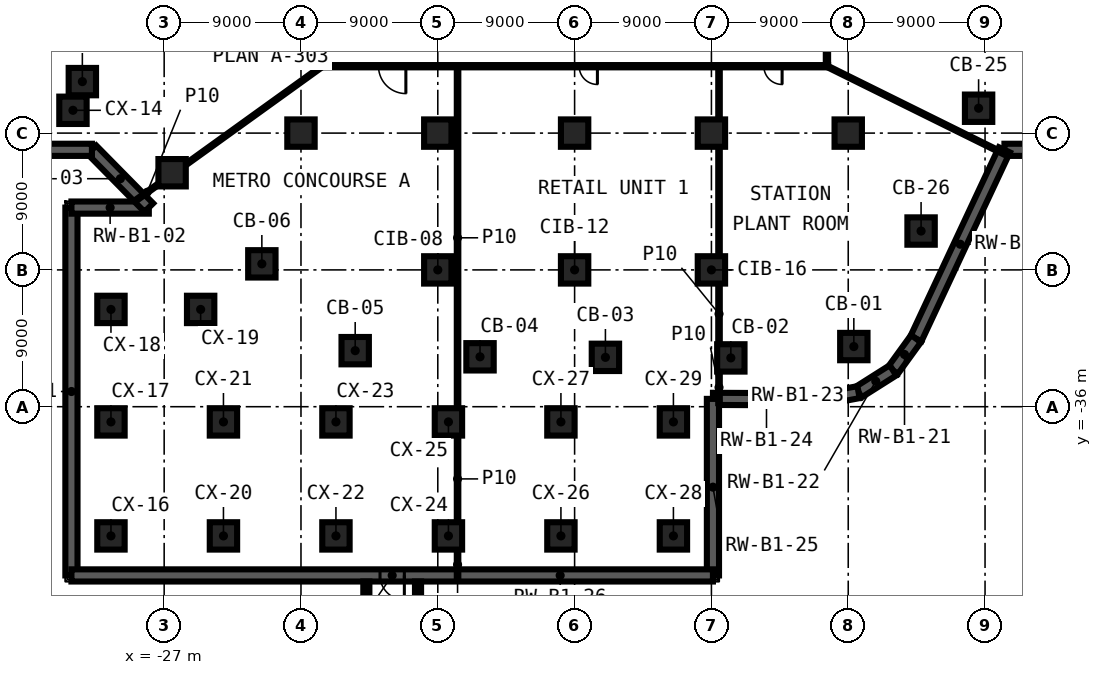
"""IFC4 building model, lengths in metres.
Left out: names, types, materials, properties, quantities, classifications, styles, units other than length and angle.
Written with IfcOpenShell. Run it as: python <this file> out.ifc"""

import sys

from ifc_helpers import new_model, si_unit, direction, frame, frame_2d, origin, origin_2d, place, context, subcontext, project, spatial, rectangle, extrude, element, fill, save


model = new_model("IFC4")
c1 = context("Model", 3, precision=1e-05, world=origin(), true_north=direction((0.0, 1.0)))
c2 = subcontext(c1, "Body", "Model", "MODEL_VIEW")
j1 = project(units=[si_unit("LENGTHUNIT", "METRE"), si_unit("PLANEANGLEUNIT", "RADIAN")], contexts=[c1])
p1 = place(None, origin())
s1 = spatial("IfcSite", under=j1, at=p1, CompositionType="ELEMENT")
p2 = place(p1, origin())
s2 = spatial("IfcBuilding", under=s1, at=p2, CompositionType="ELEMENT")
p3 = place(p2, frame((0.0, 0.0, -6.0)))
s3 = spatial("IfcBuildingStorey", under=s2, at=p3, CompositionType="ELEMENT", Elevation=-6.0)
for number, where, z_axis, x_axis in (
    (1, (18.368, -32.043, 0.0), (0.0, 0.0, 1.0), (1.0, 0.0, 0.0)),
    (2, (10.277, -32.79, 0.0), (0.0, 0.0, 1.0), (1.0, 0.0, 0.0)),
    (3, (2.027, -32.753, 0.0), (0.0, 0.0, 1.0), (1.0, 0.0, 0.0)),
    (4, (-6.222, -32.717, 0.0), (0.0, 0.0, 1.0), (1.0, 0.0, 0.0)),
    (5, (-14.434, -32.313, 0.0), (0.0, 0.0, 1.0), (1.0, 0.0, 0.0)),
    (6, (-20.574, -26.602, 0.0), (0.0, 0.0, 1.0), (1.0, 0.0, 0.0)),
    (7, (-26.478, -20.608, 0.0), (0.0, 0.0, 1.0), (1.0, 0.0, 0.0)),
    (8, (-32.382, -14.613, 0.0), (0.0, 0.0, 1.0), (1.0, 0.0, 0.0)),
    (9, (26.576, -16.364, 0.0), (0.0, 0.0, 1.0), (1.0, 0.0, 0.0)),
    (10, (22.792, -24.443, 0.0), (0.0, 0.0, 1.0), (1.0, 0.0, 0.0)),
    (11, (-18.0, -18.0, 0.0), (0.0, 0.0, 1.0), (1.0, 0.0, 0.0)),
    (12, (-9.0, -27.0, 0.0), (0.0, 0.0, 1.0), (1.0, 0.0, 0.0)),
    (13, (-9.0, -18.0, 0.0), (0.0, 0.0, 1.0), (1.0, 0.0, 0.0)),
    (14, (0.0, -27.0, 0.0), (0.0, 0.0, 1.0), (1.0, 0.0, 0.0)),
    (15, (0.0, -18.0, 0.0), (0.0, 0.0, 1.0), (1.0, 0.0, 0.0)),
    (16, (9.0, -27.0, 0.0), (0.0, 0.0, 1.0), (1.0, 0.0, 0.0)),
    (17, (9.0, -18.0, 0.0), (0.0, 0.0, 1.0), (1.0, 0.0, 0.0)),
    (18, (18.0, -18.0, 0.0), (0.0, 0.0, 1.0), (1.0, 0.0, 0.0)),
    (19, (-33.0, -16.5, 0.0), (0.0, 0.0, 1.0), (1.0, 0.0, 0.0)),
    (20, (-30.5, -44.5, 0.0), (0.0, 0.0, 1.0), (1.0, 0.0, 0.0)),
    (21, (-30.5, -37.0, 0.0), (0.0, 0.0, 1.0), (1.0, 0.0, 0.0)),
    (22, (-30.5, -29.6, 0.0), (0.0, 0.0, 1.0), (1.0, 0.0, 0.0)),
    (23, (-24.6, -29.6, 0.0), (0.0, 0.0, 1.0), (1.0, 0.0, 0.0)),
    (24, (-23.1, -44.5, 0.0), (0.0, 0.0, 1.0), (1.0, 0.0, 0.0)),
    (25, (-23.1, -37.0, 0.0), (0.0, 0.0, 1.0), (1.0, 0.0, 0.0)),
    (26, (-15.7, -44.5, 0.0), (0.0, 0.0, 1.0), (1.0, 0.0, 0.0)),
    (27, (-15.7, -37.0, 0.0), (0.0, 0.0, 1.0), (1.0, 0.0, 0.0)),
    (28, (-8.3, -44.5, 0.0), (0.0, 0.0, 1.0), (1.0, 0.0, 0.0)),
    (29, (-8.3, -37.0, 0.0), (0.0, 0.0, 1.0), (1.0, 0.0, 0.0)),
    (30, (-0.9, -44.5, 0.0), (0.0, 0.0, 1.0), (1.0, 0.0, 0.0)),
    (31, (-0.9, -37.0, 0.0), (0.0, 0.0, 1.0), (1.0, 0.0, 0.0)),
    (32, (6.5, -44.5, 0.0), (0.0, 0.0, 1.0), (1.0, 0.0, 0.0)),
    (33, (6.5, -37.0, 0.0), (0.0, 0.0, 1.0), (1.0, 0.0, 0.0)),
):
    element("IfcColumn", number, at=place(p3, frame(where, z_axis=z_axis, x_axis=x_axis)), inside=s3, PredefinedType="COLUMN", context=c2, shape_type="SweptSolid", body=[
        extrude(rectangle(XDim=1.8, YDim=1.8, at=origin_2d()), origin(), (0.0, 0.0, 1.0), 5.55),
    ])
p4 = place(p3, frame((-33.1, -47.1, 0.0), z_axis=(0.0, 0.0, 1.0), x_axis=(0.0, 1.0, 0.0)))
e34 = element("IfcWall", 34, at=p4, inside=s3, PredefinedType="SHEAR", context=c2, shape_type="SweptSolid", body=[
    extrude(rectangle(XDim=24.2, YDim=0.8, at=frame_2d((12.1, 0.0))), origin(), (0.0, 0.0, 1.0), 5.55),
])
p5 = place(p3, frame((-33.1, -22.9, 0.0), z_axis=(0.0, 0.0, 1.0), x_axis=(1.0, 0.0, 0.0)))
e35 = element("IfcWall", 35, at=p5, inside=s3, PredefinedType="SHEAR", context=c2, shape_type="SweptSolid", body=[
    extrude(rectangle(XDim=5.091, YDim=0.8, at=frame_2d((2.545, 0.0))), origin(), (0.0, 0.0, 1.0), 5.55),
])
p6 = place(p3, frame((-28.01, -22.9, 0.0), z_axis=(0.0, 0.0, 1.0), x_axis=(-0.701730823209, 0.712442174326, 0.0)))
e36 = element("IfcWall", 36, at=p6, inside=s3, PredefinedType="SHEAR", context=c2, shape_type="SweptSolid", body=[
    extrude(rectangle(XDim=5.333, YDim=0.8, at=frame_2d((2.667, 0.0))), origin(), (0.0, 0.0, 1.0), 5.55),
])
p7 = place(p3, frame((-31.752, -19.1, 0.0), z_axis=(0.0, 0.0, 1.0), x_axis=(-1.0, 0.0, 0.0)))
e37 = element("IfcWall", 37, at=p7, inside=s3, PredefinedType="SHEAR", context=c2, shape_type="SweptSolid", body=[
    extrude(rectangle(XDim=27.348, YDim=0.8, at=frame_2d((13.674, 0.0))), origin(), (0.0, 0.0, 1.0), 5.55),
])
p8 = place(p3, frame((59.1, -19.1, 0.0), z_axis=(0.0, 0.0, 1.0), x_axis=(-1.0, 0.0, 0.0)))
e38 = element("IfcWall", 38, at=p8, inside=s3, PredefinedType="SHEAR", context=c2, shape_type="SweptSolid", body=[
    extrude(rectangle(XDim=30.824, YDim=0.8, at=frame_2d((15.412, 0.0))), origin(), (0.0, 0.0, 1.0), 5.55),
])
p9 = place(p3, frame((28.276, -19.1, 0.0), z_axis=(0.0, 0.0, 1.0), x_axis=(-0.42412057434, -0.905605730118, 0.0)))
e39 = element("IfcWall", 39, at=p9, inside=s3, PredefinedType="SHEAR", context=c2, shape_type="SweptSolid", body=[
    extrude(rectangle(XDim=13.717, YDim=0.8, at=frame_2d((6.858, 0.0))), origin(), (0.0, 0.0, 1.0), 5.55),
])
p10 = place(p3, frame((22.458, -31.522, 0.0), z_axis=(0.0, 0.0, 1.0), x_axis=(-0.587157005509, -0.809473069893, 0.0)))
e40 = element("IfcWall", 40, at=p10, inside=s3, PredefinedType="SHEAR", context=c2, shape_type="SweptSolid", body=[
    extrude(rectangle(XDim=2.576, YDim=0.8, at=frame_2d((1.288, 0.0))), origin(), (0.0, 0.0, 1.0), 5.55),
])
p11 = place(p3, frame((20.945, -33.608, 0.0), z_axis=(0.0, 0.0, 1.0), x_axis=(-0.845015067359, -0.534742494979, 0.0)))
e41 = element("IfcWall", 41, at=p11, inside=s3, PredefinedType="SHEAR", context=c2, shape_type="SweptSolid", body=[
    extrude(rectangle(XDim=2.683, YDim=0.8, at=frame_2d((1.342, 0.0))), origin(), (0.0, 0.0, 1.0), 5.55),
])
p12 = place(p3, frame((18.678, -35.042, 0.0), z_axis=(0.0, 0.0, 1.0), x_axis=(-0.982922568448, -0.184019630572, 0.0)))
e42 = element("IfcWall", 42, at=p12, inside=s3, PredefinedType="SHEAR", context=c2, shape_type="SweptSolid", body=[
    extrude(rectangle(XDim=2.576, YDim=0.8, at=frame_2d((1.288, 0.0))), origin(), (0.0, 0.0, 1.0), 5.55),
])
p13 = place(p3, frame((16.146, -35.517, 0.0), z_axis=(0.0, 0.0, 1.0), x_axis=(-0.999990008966, 0.004470119591, 0.0)))
e43 = element("IfcWall", 43, at=p13, inside=s3, PredefinedType="SHEAR", context=c2, shape_type="SweptSolid", body=[
    extrude(rectangle(XDim=7.045, YDim=0.8, at=frame_2d((3.523, 0.0))), origin(), (0.0, 0.0, 1.0), 5.55),
])
p14 = place(p3, frame((9.1, -35.485, 0.0), z_axis=(0.0, 0.0, 1.0), x_axis=(0.0, -1.0, 0.0)))
e44 = element("IfcWall", 44, at=p14, inside=s3, PredefinedType="SHEAR", context=c2, shape_type="SweptSolid", body=[
    extrude(rectangle(XDim=11.615, YDim=0.8, at=frame_2d((5.808, 0.0))), origin(), (0.0, 0.0, 1.0), 5.55),
])
p15 = place(p3, frame((9.1, -47.1, 0.0), z_axis=(0.0, 0.0, 1.0), x_axis=(-1.0, 0.0, 0.0)))
e45 = element("IfcWall", 45, at=p15, inside=s3, PredefinedType="SHEAR", context=c2, shape_type="SweptSolid", body=[
    extrude(rectangle(XDim=42.2, YDim=0.8, at=frame_2d((21.1, 0.0))), origin(), (0.0, 0.0, 1.0), 5.55),
])
p16 = place(p15, frame((20.3, 0.0, 0.0)))
e46 = element("IfcOpeningElement", 46, at=p16, cuts=e45, PredefinedType="OPENING", context=c2, shape_type="SweptSolid", body=[
    extrude(rectangle(XDim=1.6, YDim=2.4, at=frame_2d((0.8, 1.2))), frame((0.0, 0.41, 0.0), z_axis=(0.0, -1.0, 0.0), x_axis=(1.0, 0.0, 0.0)), (0.0, 0.0, 1.0), 0.82),
])
p17 = place(p3, frame((16.675, -13.6, 0.0), z_axis=(0.0, 0.0, 1.0), x_axis=(-1.0, 0.0, 0.0)))
e47 = element("IfcWall", 47, at=p17, inside=s3, PredefinedType="PARTITIONING", context=c2, shape_type="SweptSolid", body=[
    extrude(rectangle(XDim=33.35, YDim=0.15, at=frame_2d((16.675, 0.0))), origin(), (0.0, 0.0, 1.0), 5.55),
])
p18 = place(p17, frame((27.775, 0.0, 0.0)))
e48 = element("IfcOpeningElement", 48, at=p18, cuts=e47, PredefinedType="OPENING", context=c2, shape_type="SweptSolid", body=[
    extrude(rectangle(XDim=1.8, YDim=2.4, at=frame_2d((0.9, 1.2))), frame((0.0, 0.085, 0.0), z_axis=(0.0, -1.0, 0.0), x_axis=(1.0, 0.0, 0.0)), (0.0, 0.0, 1.0), 0.17),
])
p19 = place(p17, frame((15.175, 0.0, 0.0)))
e49 = element("IfcOpeningElement", 49, at=p19, cuts=e47, PredefinedType="OPENING", context=c2, shape_type="SweptSolid", body=[
    extrude(rectangle(XDim=1.2, YDim=2.1, at=frame_2d((0.6, 1.05))), frame((0.0, 0.085, 0.0), z_axis=(0.0, -1.0, 0.0), x_axis=(1.0, 0.0, 0.0)), (0.0, 0.0, 1.0), 0.17),
])
p20 = place(p17, frame((3.025, 0.0, 0.0)))
e50 = element("IfcOpeningElement", 50, at=p20, cuts=e47, PredefinedType="OPENING", context=c2, shape_type="SweptSolid", body=[
    extrude(rectangle(XDim=1.2, YDim=2.1, at=frame_2d((0.6, 1.05))), frame((0.0, 0.085, 0.0), z_axis=(0.0, -1.0, 0.0), x_axis=(1.0, 0.0, 0.0)), (0.0, 0.0, 1.0), 0.17),
])
p21 = place(p3, frame((-28.865, -22.43, 0.0), z_axis=(0.0, 0.0, 1.0), x_axis=(0.811531815169, 0.584308234555, 0.0)))
e51 = element("IfcWall", 51, at=p21, inside=s3, PredefinedType="PARTITIONING", context=c2, shape_type="SweptSolid", body=[
    extrude(rectangle(XDim=1.833, YDim=0.1, at=frame_2d((0.917, 0.0))), origin(), (0.0, 0.0, 1.0), 5.55),
])
p22 = place(p3, frame((-25.578, -20.063, 0.0), z_axis=(0.0, 0.0, 1.0), x_axis=(0.811568664577, 0.584257051885, 0.0)))
e52 = element("IfcWall", 52, at=p22, inside=s3, PredefinedType="PARTITIONING", context=c2, shape_type="SweptSolid", body=[
    extrude(rectangle(XDim=11.062, YDim=0.1, at=frame_2d((5.531, 0.0))), origin(), (0.0, 0.0, 1.0), 5.55),
])
p23 = place(p3, frame((16.6, 13.525, 0.0), z_axis=(0.0, 0.0, 1.0), x_axis=(0.0, -1.0, 0.0)))
e53 = element("IfcWall", 53, at=p23, inside=s3, PredefinedType="PARTITIONING", context=c2, shape_type="SweptSolid", body=[
    extrude(rectangle(XDim=27.05, YDim=0.15, at=frame_2d((13.525, 0.0))), origin(), (0.0, 0.0, 1.0), 5.55),
])
p24 = place(p23, frame((18.025, 0.0, 0.0)))
e54 = element("IfcOpeningElement", 54, at=p24, cuts=e53, PredefinedType="OPENING", context=c2, shape_type="SweptSolid", body=[
    extrude(rectangle(XDim=1.2, YDim=2.1, at=frame_2d((0.6, 1.05))), frame((0.0, 0.085, 0.0), z_axis=(0.0, -1.0, 0.0), x_axis=(1.0, 0.0, 0.0)), (0.0, 0.0, 1.0), 0.17),
])
p25 = place(p3, frame((9.5, -35.767, 0.0), z_axis=(0.0, 0.0, 1.0), x_axis=(0.0, 1.0, 0.0)))
e55 = element("IfcWall", 55, at=p25, inside=s3, PredefinedType="PARTITIONING", context=c2, shape_type="SweptSolid", body=[
    extrude(rectangle(XDim=2.077, YDim=0.1, at=frame_2d((1.039, 0.0))), origin(), (0.0, 0.0, 1.0), 5.55),
])
p26 = place(p3, frame((9.5, -31.89, 0.0), z_axis=(0.0, 0.0, 1.0), x_axis=(0.0, 1.0, 0.0)))
e56 = element("IfcWall", 56, at=p26, inside=s3, PredefinedType="PARTITIONING", context=c2, shape_type="SweptSolid", body=[
    extrude(rectangle(XDim=3.99, YDim=0.1, at=frame_2d((1.995, 0.0))), origin(), (0.0, 0.0, 1.0), 5.55),
])
p27 = place(p3, frame((9.5, -26.1, 0.0), z_axis=(0.0, 0.0, 1.0), x_axis=(0.0, 1.0, 0.0)))
e57 = element("IfcWall", 57, at=p27, inside=s3, PredefinedType="PARTITIONING", context=c2, shape_type="SweptSolid", body=[
    extrude(rectangle(XDim=7.2, YDim=0.1, at=frame_2d((3.6, 0.0))), origin(), (0.0, 0.0, 1.0), 5.55),
])
p28 = place(p3, frame((9.5, -17.1, 0.0), z_axis=(0.0, 0.0, 1.0), x_axis=(0.0, 1.0, 0.0)))
e58 = element("IfcWall", 58, at=p28, inside=s3, PredefinedType="PARTITIONING", context=c2, shape_type="SweptSolid", body=[
    extrude(rectangle(XDim=3.425, YDim=0.1, at=frame_2d((1.712, 0.0))), origin(), (0.0, 0.0, 1.0), 5.55),
])
p29 = place(p3, frame((-7.7, -47.38, 0.0), z_axis=(0.0, 0.0, 1.0), x_axis=(0.0, 1.0, 0.0)))
e59 = element("IfcWall", 59, at=p29, inside=s3, PredefinedType="PARTITIONING", context=c2, shape_type="SweptSolid", body=[
    extrude(rectangle(XDim=1.98, YDim=0.1, at=frame_2d((0.99, 0.0))), origin(), (0.0, 0.0, 1.0), 5.55),
])
p30 = place(p3, frame((-7.7, -43.6, 0.0), z_axis=(0.0, 0.0, 1.0), x_axis=(0.0, 1.0, 0.0)))
e60 = element("IfcWall", 60, at=p30, inside=s3, PredefinedType="PARTITIONING", context=c2, shape_type="SweptSolid", body=[
    extrude(rectangle(XDim=5.7, YDim=0.1, at=frame_2d((2.85, 0.0))), origin(), (0.0, 0.0, 1.0), 5.55),
])
p31 = place(p3, frame((-7.7, -36.1, 0.0), z_axis=(0.0, 0.0, 1.0), x_axis=(0.0, 1.0, 0.0)))
e61 = element("IfcWall", 61, at=p31, inside=s3, PredefinedType="PARTITIONING", context=c2, shape_type="SweptSolid", body=[
    extrude(rectangle(XDim=22.425, YDim=0.1, at=frame_2d((11.212, 0.0))), origin(), (0.0, 0.0, 1.0), 5.55),
])
p32 = place(p3, frame((-16.6, -13.525, 0.0), z_axis=(0.0, 0.0, 1.0), x_axis=(0.0, 1.0, 0.0)))
e62 = element("IfcWall", 62, at=p32, inside=s3, PredefinedType="PARTITIONING", context=c2, shape_type="SweptSolid", body=[
    extrude(rectangle(XDim=27.05, YDim=0.15, at=frame_2d((13.525, 0.0))), origin(), (0.0, 0.0, 1.0), 5.55),
])
p33 = place(p32, frame((17.605, 0.0, 0.0)))
e63 = element("IfcOpeningElement", 63, at=p33, cuts=e62, PredefinedType="OPENING", context=c2, shape_type="SweptSolid", body=[
    extrude(rectangle(XDim=1.8, YDim=2.4, at=frame_2d((0.9, 1.2))), frame((0.0, 0.085, 0.0), z_axis=(0.0, -1.0, 0.0), x_axis=(1.0, 0.0, 0.0)), (0.0, 0.0, 1.0), 0.17),
])
p34 = place(p3, frame((16.6, -13.6, 0.0), z_axis=(0.0, 0.0, 1.0), x_axis=(0.896402741042, -0.443240483093, 0.0)))
e64 = element("IfcWall", 64, at=p34, inside=s3, PredefinedType="PARTITIONING", context=c2, shape_type="SweptSolid", body=[
    extrude(rectangle(XDim=13.189, YDim=0.1, at=frame_2d((6.595, 0.0))), origin(), (0.0, 0.0, 1.0), 5.55),
])
p35 = place(p2, origin())
s4 = spatial("IfcBuildingStorey", under=s2, at=p35, CompositionType="ELEMENT", Elevation=0.0)
for number, where, z_axis, x_axis in (
    (65, (-13.7, -47.5, -17.0), (0.0, 0.0, 1.0), (0.0, -1.0, 0.0)),
    (66, (-10.3, -47.5, -17.0), (0.0, 0.0, 1.0), (0.0, -1.0, 0.0)),
):
    element("IfcWall", number, at=place(p35, frame(where, z_axis=z_axis, x_axis=x_axis)), inside=s4, PredefinedType="SHEAR", context=c2, shape_type="SweptSolid", body=[
        extrude(rectangle(XDim=8.6, YDim=0.4, at=frame_2d((4.3, 0.0))), origin(), (0.0, 0.0, 1.0), 16.7),
    ])
p36 = place(p18, origin())
e67 = element("IfcDoor", 67, at=p36, inside=s3, OperationType="DOUBLE_DOOR_SINGLE_SWING", PredefinedType="DOOR", context=c2, shape_type="SweptSolid", body=[
    extrude(rectangle(XDim=1.8, YDim=2.4, at=frame_2d((0.9, 1.2))), frame((0.0, 0.025, 0.0), z_axis=(0.0, -1.0, 0.0), x_axis=(1.0, 0.0, 0.0)), (0.0, 0.0, 1.0), 0.05),
])
fill(e48, e67)
p37 = place(p19, origin())
e68 = element("IfcDoor", 68, at=p37, inside=s3, OperationType="SINGLE_SWING_RIGHT", PredefinedType="DOOR", context=c2, shape_type="SweptSolid", body=[
    extrude(rectangle(XDim=1.2, YDim=2.1, at=frame_2d((0.6, 1.05))), frame((0.0, 0.025, 0.0), z_axis=(0.0, -1.0, 0.0), x_axis=(1.0, 0.0, 0.0)), (0.0, 0.0, 1.0), 0.05),
])
fill(e49, e68)
p38 = place(p20, origin())
e69 = element("IfcDoor", 69, at=p38, inside=s3, OperationType="SINGLE_SWING_LEFT", PredefinedType="DOOR", context=c2, shape_type="SweptSolid", body=[
    extrude(rectangle(XDim=1.2, YDim=2.1, at=frame_2d((0.6, 1.05))), frame((0.0, 0.025, 0.0), z_axis=(0.0, -1.0, 0.0), x_axis=(1.0, 0.0, 0.0)), (0.0, 0.0, 1.0), 0.05),
])
fill(e50, e69)
p39 = place(p16, origin())
e70 = element("IfcDoor", 70, at=p39, inside=s3, OperationType="SINGLE_SWING_LEFT", PredefinedType="DOOR", context=c2, shape_type="SweptSolid", body=[
    extrude(rectangle(XDim=1.6, YDim=2.4, at=frame_2d((0.8, 1.2))), frame((0.0, 0.025, 0.0), z_axis=(0.0, -1.0, 0.0), x_axis=(1.0, 0.0, 0.0)), (0.0, 0.0, 1.0), 0.05),
])
fill(e46, e70)
save(model, sys.argv[1])
